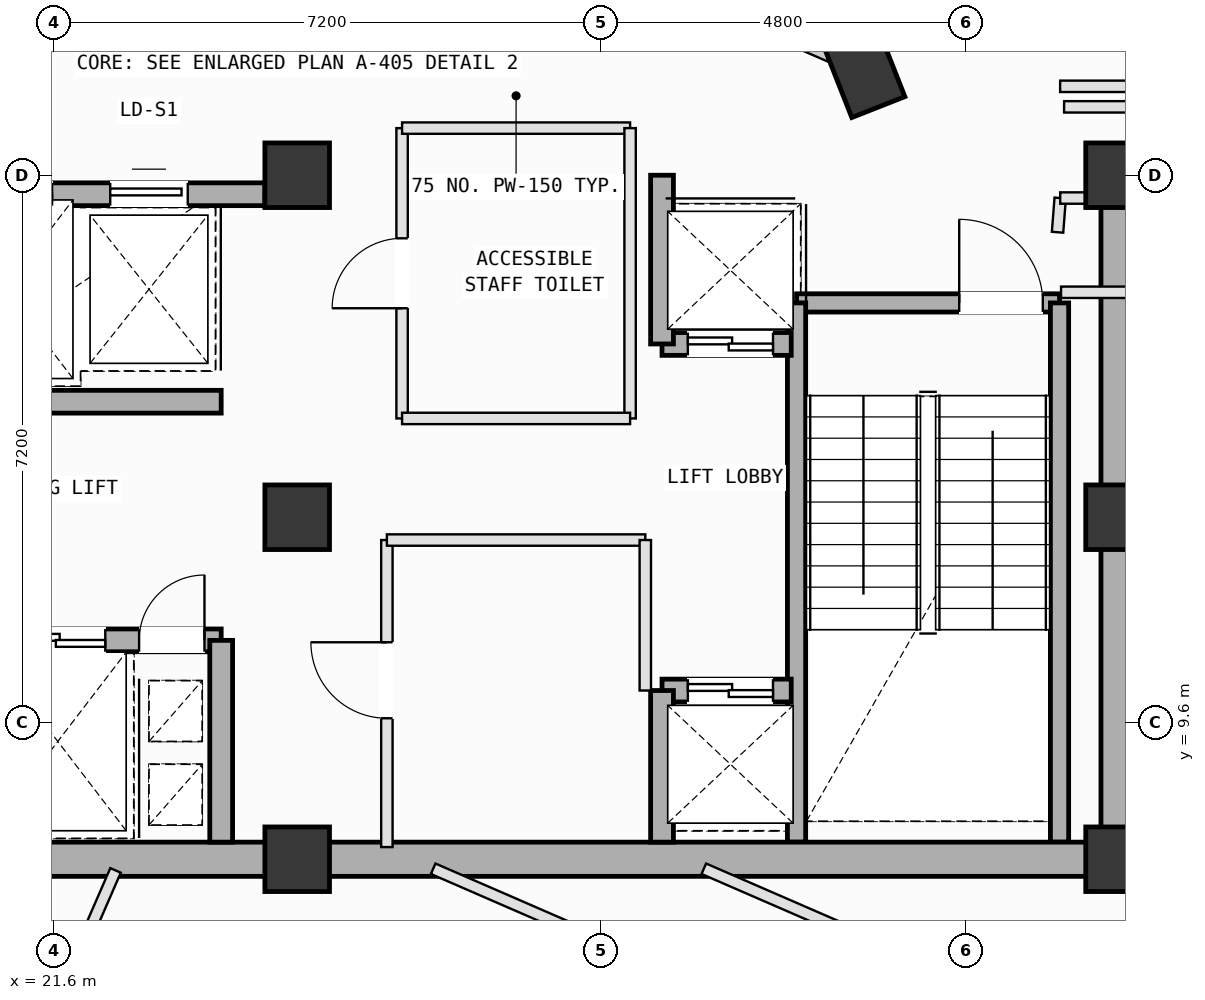
"""IFC4 building model, lengths in metres.
Left out: names, types, materials, properties, quantities, classifications, styles, units other than length and angle.
Written with IfcOpenShell. Run it as: python <this file> out.ifc"""

import sys

from ifc_helpers import new_model, si_unit, direction, frame, frame_2d, origin, origin_2d, place, context, subcontext, project, spatial, rectangle, extrude, element, fill, save


model = new_model("IFC4")
c1 = context("Model", 3, precision=1e-05, world=origin(), true_north=direction((0.0, 1.0)))
c2 = subcontext(c1, "Body", "Model", "MODEL_VIEW")
j1 = project(units=[si_unit("LENGTHUNIT", "METRE"), si_unit("PLANEANGLEUNIT", "RADIAN")], contexts=[c1])
p1 = place(None, origin())
s1 = spatial("IfcSite", under=j1, at=p1, CompositionType="ELEMENT")
p2 = place(p1, origin())
s2 = spatial("IfcBuilding", under=s1, at=p2, CompositionType="ELEMENT")
p3 = place(p2, frame((0.0, 0.0, 308.6)))
s3 = spatial("IfcBuildingStorey", under=s2, at=p3, CompositionType="ELEMENT", Elevation=308.6)
for number, where, z_axis, x_axis in (
    (1, (24.8, 7.8, 0.0), (0.0, 0.0, 1.0), (1.0, 0.0, 0.0)),
    (2, (24.8, 12.3, 0.0), (0.0, 0.0, 1.0), (1.0, 0.0, 0.0)),
    (3, (24.8, 16.8, 0.0), (0.0, 0.0, 1.0), (1.0, 0.0, 0.0)),
    (4, (35.6, 7.8, 0.0), (0.0, 0.0, 1.0), (1.0, 0.0, 0.0)),
    (5, (35.6, 12.3, 0.0), (0.0, 0.0, 1.0), (1.0, 0.0, 0.0)),
    (6, (35.6, 16.8, 0.0), (0.0, 0.0, 1.0), (1.0, 0.0, 0.0)),
):
    element("IfcColumn", number, at=place(p3, frame(where, z_axis=z_axis, x_axis=x_axis)), inside=s3, PredefinedType="COLUMN", context=c2, shape_type="SweptSolid", body=[
        extrude(rectangle(XDim=0.85, YDim=0.85, at=origin_2d()), origin(), (0.0, 0.0, 1.0), 4.0),
    ])
p4 = place(p3, frame((32.226, 18.255, 0.002), z_axis=(0.0, 0.0, 1.0), x_axis=(-0.366501226724, 0.930417567982, 0.0)))
e7 = element("IfcColumn", 7, at=p4, inside=s3, PredefinedType="COLUMN", context=c2, shape_type="SweptSolid", body=[
    extrude(rectangle(XDim=1.2, YDim=0.75, at=origin_2d()), origin(), (0.0, 0.0, 1.0), 3.996),
])
p5 = place(p3, frame((25.484, 21.187, 0.0), z_axis=(0.0, 0.0, 1.0), x_axis=(0.917060568388, -0.398747932794, 0.0)))
e8 = element("IfcWall", 8, at=p5, inside=s3, PredefinedType="SOLIDWALL", context=c2, shape_type="SweptSolid", body=[
    extrude(rectangle(XDim=6.955, YDim=0.28, at=frame_2d((3.478, 0.0))), origin(), (0.0, 0.0, 1.0), 2.765),
])
p6 = place(p3, frame((31.37, 15.12, 0.0), z_axis=(0.0, 0.0, 1.0), x_axis=(1.0, 0.0, 0.0)))
e9 = element("IfcWall", 9, at=p6, inside=s3, PredefinedType="SOLIDWALL", context=c2, shape_type="SweptSolid", body=[
    extrude(rectangle(XDim=3.46, YDim=0.24, at=frame_2d((1.73, 0.0))), origin(), (0.0, 0.0, 1.0), 3.78),
])
p7 = place(p6, frame((2.14, 0.0, 0.0)))
e10 = element("IfcOpeningElement", 10, at=p7, cuts=e9, PredefinedType="OPENING", context=c2, shape_type="SweptSolid", body=[
    extrude(rectangle(XDim=1.1, YDim=2.15, at=frame_2d((0.55, 1.075))), frame((0.0, 0.13, 0.0), z_axis=(0.0, -1.0, 0.0), x_axis=(1.0, 0.0, 0.0)), (0.0, 0.0, 1.0), 0.26),
])
for number, where, z_axis, x_axis in (
    (11, (34.83, 15.12, 0.0), (0.0, 0.0, 1.0), (0.0, -1.0, 0.0)),
    (12, (31.37, 8.025, 0.0), (0.0, 0.0, 1.0), (0.0, 1.0, 0.0)),
):
    element("IfcWall", number, at=place(p3, frame(where, z_axis=z_axis, x_axis=x_axis)), inside=s3, PredefinedType="SOLIDWALL", context=c2, shape_type="SweptSolid", body=[
        extrude(rectangle(XDim=7.095, YDim=0.24, at=frame_2d((3.548, 0.0))), origin(), (0.0, 0.0, 1.0), 3.78),
    ])
for number, where, z_axis, x_axis in (
    (13, (14.0, 7.8, 0.0), (0.0, 0.0, 1.0), (1.0, 0.0, 0.0)),
    (14, (24.8, 7.8, 0.0), (0.0, 0.0, 1.0), (1.0, 0.0, 0.0)),
):
    element("IfcWall", number, at=place(p3, frame(where, z_axis=z_axis, x_axis=x_axis)), inside=s3, PredefinedType="SHEAR", context=c2, shape_type="SweptSolid", body=[
        extrude(rectangle(XDim=10.8, YDim=0.45, at=frame_2d((5.4, 0.0))), origin(), (0.0, 0.0, 1.0), 3.78),
    ])
p8 = place(p3, frame((35.6, 7.8, 0.0), z_axis=(0.0, 0.0, 1.0), x_axis=(0.0, 1.0, 0.0)))
e15 = element("IfcWall", 15, at=p8, inside=s3, PredefinedType="SHEAR", context=c2, shape_type="SweptSolid", body=[
    extrude(rectangle(XDim=9.0, YDim=0.45, at=frame_2d((4.5, 0.0))), origin(), (0.0, 0.0, 1.0), 3.78),
])
p9 = place(p3, frame((19.85, 16.55, 0.0), z_axis=(0.0, 0.0, 1.0), x_axis=(1.0, 0.0, 0.0)))
e16 = element("IfcWall", 16, at=p9, inside=s3, PredefinedType="SOLIDWALL", context=c2, shape_type="SweptSolid", body=[
    extrude(rectangle(XDim=4.525, YDim=0.3, at=frame_2d((2.262, 0.0))), origin(), (0.0, 0.0, 1.0), 3.78),
])
p10 = place(p9, frame((0.475, 0.0, 0.0)))
e17 = element("IfcOpeningElement", 17, at=p10, cuts=e16, PredefinedType="OPENING", context=c2, shape_type="SweptSolid", body=[
    extrude(rectangle(XDim=1.25, YDim=2.18, at=frame_2d((0.625, 1.09))), frame((0.0, 0.16, 0.0), z_axis=(0.0, -1.0, 0.0), x_axis=(1.0, 0.0, 0.0)), (0.0, 0.0, 1.0), 0.32),
])
p11 = place(p9, frame((2.49, 0.0, 0.0)))
e18 = element("IfcOpeningElement", 18, at=p11, cuts=e16, PredefinedType="OPENING", context=c2, shape_type="SweptSolid", body=[
    extrude(rectangle(XDim=1.02, YDim=2.12, at=frame_2d((0.51, 1.06))), frame((0.0, 0.16, 0.0), z_axis=(0.0, -1.0, 0.0), x_axis=(1.0, 0.0, 0.0)), (0.0, 0.0, 1.0), 0.32),
])
p12 = place(p3, frame((18.5, 10.68, 0.0), z_axis=(0.0, 0.0, 1.0), x_axis=(1.0, 0.0, 0.0)))
e19 = element("IfcWall", 19, at=p12, inside=s3, PredefinedType="SOLIDWALL", context=c2, shape_type="SweptSolid", body=[
    extrude(rectangle(XDim=5.3, YDim=0.3, at=frame_2d((2.65, 0.0))), origin(), (0.0, 0.0, 1.0), 3.78),
])
p13 = place(p12, frame((4.22, 0.0, 0.0)))
e20 = element("IfcOpeningElement", 20, at=p13, cuts=e19, PredefinedType="OPENING", context=c2, shape_type="SweptSolid", body=[
    extrude(rectangle(XDim=0.86, YDim=2.06, at=frame_2d((0.43, 1.03))), frame((0.0, 0.16, 0.0), z_axis=(0.0, -1.0, 0.0), x_axis=(1.0, 0.0, 0.0)), (0.0, 0.0, 1.0), 0.32),
])
p14 = place(p12, frame((0.425, 0.0, 0.0)))
e21 = element("IfcOpeningElement", 21, at=p14, cuts=e19, PredefinedType="OPENING", context=c2, shape_type="SweptSolid", body=[
    extrude(rectangle(XDim=1.25, YDim=2.18, at=frame_2d((0.625, 1.09))), frame((0.0, 0.16, 0.0), z_axis=(0.0, -1.0, 0.0), x_axis=(1.0, 0.0, 0.0)), (0.0, 0.0, 1.0), 0.32),
])
p15 = place(p12, frame((2.525, 0.0, 0.0)))
e22 = element("IfcOpeningElement", 22, at=p15, cuts=e19, PredefinedType="OPENING", context=c2, shape_type="SweptSolid", body=[
    extrude(rectangle(XDim=1.25, YDim=2.18, at=frame_2d((0.625, 1.09))), frame((0.0, 0.16, 0.0), z_axis=(0.0, -1.0, 0.0), x_axis=(1.0, 0.0, 0.0)), (0.0, 0.0, 1.0), 0.32),
])
p16 = place(p3, frame((18.5, 13.82, 0.0), z_axis=(0.0, 0.0, 1.0), x_axis=(1.0, 0.0, 0.0)))
e23 = element("IfcWall", 23, at=p16, inside=s3, PredefinedType="SOLIDWALL", context=c2, shape_type="SweptSolid", body=[
    extrude(rectangle(XDim=5.3, YDim=0.3, at=frame_2d((2.65, 0.0))), origin(), (0.0, 0.0, 1.0), 3.78),
])
p17 = place(p16, frame((0.18, 0.0, 0.0)))
e24 = element("IfcOpeningElement", 24, at=p17, cuts=e23, PredefinedType="OPENING", context=c2, shape_type="SweptSolid", body=[
    extrude(rectangle(XDim=1.1, YDim=2.15, at=frame_2d((0.55, 1.075))), frame((0.0, 0.16, 0.0), z_axis=(0.0, -1.0, 0.0), x_axis=(1.0, 0.0, 0.0)), (0.0, 0.0, 1.0), 0.32),
])
p18 = place(p3, frame((23.8, 8.025, 0.0), z_axis=(0.0, 0.0, 1.0), x_axis=(0.0, 1.0, 0.0)))
e25 = element("IfcWall", 25, at=p18, inside=s3, PredefinedType="SOLIDWALL", context=c2, shape_type="SweptSolid", body=[
    extrude(rectangle(XDim=2.655, YDim=0.3, at=frame_2d((1.328, 0.0))), origin(), (0.0, 0.0, 1.0), 3.78),
])
p19 = place(p3, frame((29.6, 10.02, 0.0), z_axis=(0.0, 0.0, 1.0), x_axis=(1.0, 0.0, 0.0)))
e26 = element("IfcWall", 26, at=p19, inside=s3, PredefinedType="SOLIDWALL", context=c2, shape_type="SweptSolid", body=[
    extrude(rectangle(XDim=1.7, YDim=0.3, at=frame_2d((0.85, 0.0))), origin(), (0.0, 0.0, 1.0), 3.78),
])
p20 = place(p19, frame((0.34, 0.0, 0.0)))
e27 = element("IfcOpeningElement", 27, at=p20, cuts=e26, PredefinedType="OPENING", context=c2, shape_type="SweptSolid", body=[
    extrude(rectangle(XDim=1.12, YDim=2.15, at=frame_2d((0.56, 1.075))), frame((0.0, 0.16, 0.0), z_axis=(0.0, -1.0, 0.0), x_axis=(1.0, 0.0, 0.0)), (0.0, 0.0, 1.0), 0.32),
])
p21 = place(p3, frame((29.6, 8.025, 0.0), z_axis=(0.0, 0.0, 1.0), x_axis=(0.0, 1.0, 0.0)))
e28 = element("IfcWall", 28, at=p21, inside=s3, PredefinedType="SOLIDWALL", context=c2, shape_type="SweptSolid", body=[
    extrude(rectangle(XDim=1.995, YDim=0.3, at=frame_2d((0.998, 0.0))), origin(), (0.0, 0.0, 1.0), 3.78),
])
p22 = place(p3, frame((29.6, 14.58, 0.0), z_axis=(0.0, 0.0, 1.0), x_axis=(1.0, 0.0, 0.0)))
e29 = element("IfcWall", 29, at=p22, inside=s3, PredefinedType="SOLIDWALL", context=c2, shape_type="SweptSolid", body=[
    extrude(rectangle(XDim=1.7, YDim=0.3, at=frame_2d((0.85, 0.0))), origin(), (0.0, 0.0, 1.0), 3.78),
])
p23 = place(p22, frame((0.34, 0.0, 0.0)))
e30 = element("IfcOpeningElement", 30, at=p23, cuts=e29, PredefinedType="OPENING", context=c2, shape_type="SweptSolid", body=[
    extrude(rectangle(XDim=1.12, YDim=2.15, at=frame_2d((0.56, 1.075))), frame((0.0, 0.16, 0.0), z_axis=(0.0, -1.0, 0.0), x_axis=(1.0, 0.0, 0.0)), (0.0, 0.0, 1.0), 0.32),
])
p24 = place(p3, frame((29.6, 14.58, 0.0), z_axis=(0.0, 0.0, 1.0), x_axis=(0.0, 1.0, 0.0)))
e31 = element("IfcWall", 31, at=p24, inside=s3, PredefinedType="SOLIDWALL", context=c2, shape_type="SweptSolid", body=[
    extrude(rectangle(XDim=2.22, YDim=0.3, at=frame_2d((1.11, 0.0))), origin(), (0.0, 0.0, 1.0), 3.78),
])
p25 = place(p3, frame((25.98, 7.96, 0.0), z_axis=(0.0, 0.0, 1.0), x_axis=(0.0, 1.0, 0.0)))
e32 = element("IfcWall", 32, at=p25, inside=s3, PredefinedType="PARTITIONING", context=c2, shape_type="SweptSolid", body=[
    extrude(rectangle(XDim=4.04, YDim=0.15, at=frame_2d((2.02, 0.0))), origin(), (0.0, 0.0, 1.0), 3.78),
])
p26 = place(p25, frame((1.695, 0.0, 0.0)))
e33 = element("IfcOpeningElement", 33, at=p26, cuts=e32, PredefinedType="OPENING", context=c2, shape_type="SweptSolid", body=[
    extrude(rectangle(XDim=1.0, YDim=2.12, at=frame_2d((0.5, 1.06))), frame((0.0, 0.085, 0.0), z_axis=(0.0, -1.0, 0.0), x_axis=(1.0, 0.0, 0.0)), (0.0, 0.0, 1.0), 0.17),
])
p27 = place(p3, frame((25.98, 12.0, 0.0), z_axis=(0.0, 0.0, 1.0), x_axis=(1.0, 0.0, 0.0)))
e34 = element("IfcWall", 34, at=p27, inside=s3, PredefinedType="PARTITIONING", context=c2, shape_type="SweptSolid", body=[
    extrude(rectangle(XDim=3.4, YDim=0.15, at=frame_2d((1.7, 0.0))), origin(), (0.0, 0.0, 1.0), 3.78),
])
p28 = place(p3, frame((29.38, 12.0, 0.0), z_axis=(0.0, 0.0, 1.0), x_axis=(0.0, -1.0, 0.0)))
e35 = element("IfcWall", 35, at=p28, inside=s3, PredefinedType="PARTITIONING", context=c2, shape_type="SweptSolid", body=[
    extrude(rectangle(XDim=1.98, YDim=0.15, at=frame_2d((0.99, 0.0))), origin(), (0.0, 0.0, 1.0), 3.78),
])
p29 = place(p3, frame((26.18, 13.6, 0.0), z_axis=(0.0, 0.0, 1.0), x_axis=(0.0, 1.0, 0.0)))
e36 = element("IfcWall", 36, at=p29, inside=s3, PredefinedType="PARTITIONING", context=c2, shape_type="SweptSolid", body=[
    extrude(rectangle(XDim=3.82, YDim=0.15, at=frame_2d((1.91, 0.0))), origin(), (0.0, 0.0, 1.0), 3.78),
])
p30 = place(p29, frame((1.45, 0.0, 0.0)))
e37 = element("IfcOpeningElement", 37, at=p30, cuts=e36, PredefinedType="OPENING", context=c2, shape_type="SweptSolid", body=[
    extrude(rectangle(XDim=0.92, YDim=2.1, at=frame_2d((0.46, 1.05))), frame((0.0, 0.085, 0.0), z_axis=(0.0, -1.0, 0.0), x_axis=(1.0, 0.0, 0.0)), (0.0, 0.0, 1.0), 0.17),
])
p31 = place(p3, frame((26.18, 17.42, 0.0), z_axis=(0.0, 0.0, 1.0), x_axis=(1.0, 0.0, 0.0)))
e38 = element("IfcWall", 38, at=p31, inside=s3, PredefinedType="PARTITIONING", context=c2, shape_type="SweptSolid", body=[
    extrude(rectangle(XDim=3.0, YDim=0.15, at=frame_2d((1.5, 0.0))), origin(), (0.0, 0.0, 1.0), 3.78),
])
p32 = place(p3, frame((29.18, 17.42, 0.0), z_axis=(0.0, 0.0, 1.0), x_axis=(0.0, -1.0, 0.0)))
e39 = element("IfcWall", 39, at=p32, inside=s3, PredefinedType="PARTITIONING", context=c2, shape_type="SweptSolid", body=[
    extrude(rectangle(XDim=3.82, YDim=0.15, at=frame_2d((1.91, 0.0))), origin(), (0.0, 0.0, 1.0), 3.78),
])
p33 = place(p3, frame((29.18, 13.6, 0.0), z_axis=(0.0, 0.0, 1.0), x_axis=(-1.0, 0.0, 0.0)))
e40 = element("IfcWall", 40, at=p33, inside=s3, PredefinedType="PARTITIONING", context=c2, shape_type="SweptSolid", body=[
    extrude(rectangle(XDim=3.0, YDim=0.15, at=frame_2d((1.5, 0.0))), origin(), (0.0, 0.0, 1.0), 3.78),
])
p34 = place(p3, frame((33.286, -4.26, 0.0), z_axis=(0.0, 0.0, 1.0), x_axis=(0.398794571869, 0.9170402878, 0.0)))
e41 = element("IfcWall", 41, at=p34, inside=s3, PredefinedType="PARTITIONING", context=c2, shape_type="SweptSolid", body=[
    extrude(rectangle(XDim=13.04, YDim=0.15, at=frame_2d((6.52, 0.0))), origin(), (0.0, 0.0, 1.0), 2.765),
])
p35 = place(p3, frame((20.345, 2.905, 0.0), z_axis=(0.0, 0.0, 1.0), x_axis=(0.398819215719, 0.917029570501, 0.0)))
e42 = element("IfcWall", 42, at=p35, inside=s3, PredefinedType="PARTITIONING", context=c2, shape_type="SweptSolid", body=[
    extrude(rectangle(XDim=5.178, YDim=0.15, at=frame_2d((2.589, 0.0))), origin(), (0.0, 0.0, 1.0), 3.78),
])
p36 = place(p35, frame((2.075, 0.0, 0.0)))
e43 = element("IfcOpeningElement", 43, at=p36, cuts=e42, PredefinedType="OPENING", context=c2, shape_type="SweptSolid", body=[
    extrude(rectangle(XDim=0.86, YDim=2.06, at=frame_2d((0.43, 1.03))), frame((0.0, 0.085, 0.0), z_axis=(0.0, -1.0, 0.0), x_axis=(1.0, 0.0, 0.0)), (0.0, 0.0, 1.0), 0.17),
])
p37 = place(p3, frame((26.589, 7.675, 0.0), z_axis=(0.0, 0.0, 1.0), x_axis=(0.917085632944, -0.398690283112, 0.0)))
e44 = element("IfcWall", 44, at=p37, inside=s3, PredefinedType="PARTITIONING", context=c2, shape_type="SweptSolid", body=[
    extrude(rectangle(XDim=10.216, YDim=0.15, at=frame_2d((5.108, 0.0))), origin(), (0.0, 0.0, 1.0), 3.78),
])
p38 = place(p37, frame((5.131, 0.0, 0.0)))
e45 = element("IfcOpeningElement", 45, at=p38, cuts=e44, PredefinedType="OPENING", context=c2, shape_type="SweptSolid", body=[
    extrude(rectangle(XDim=0.86, YDim=2.06, at=frame_2d((0.43, 1.03))), frame((0.0, 0.085, 0.0), z_axis=(0.0, -1.0, 0.0), x_axis=(1.0, 0.0, 0.0)), (0.0, 0.0, 1.0), 0.17),
])
p39 = place(p3, frame((34.804, 16.05, 0.0), z_axis=(0.0, 0.0, 1.0), x_axis=(0.077896068279, 0.996961484987, 0.0)))
e46 = element("IfcWall", 46, at=p39, inside=s3, PredefinedType="PARTITIONING", context=c2, shape_type="SweptSolid", body=[
    extrude(rectangle(XDim=0.451, YDim=0.15, at=frame_2d((0.226, 0.0))), origin(), (0.0, 0.0, 1.0), 3.78),
])
p40 = place(p3, frame((34.839, 16.5, 0.0), z_axis=(0.0, 0.0, 1.0), x_axis=(1.0, 0.0, 0.0)))
e47 = element("IfcWall", 47, at=p40, inside=s3, PredefinedType="PARTITIONING", context=c2, shape_type="SweptSolid", body=[
    extrude(rectangle(XDim=1.661, YDim=0.15, at=frame_2d((0.831, 0.0))), origin(), (0.0, 0.0, 1.0), 2.765),
])
p41 = place(p3, frame((36.5, 17.7, 0.0), z_axis=(0.0, 0.0, 1.0), x_axis=(-1.0, 0.0, 0.0)))
e48 = element("IfcWall", 48, at=p41, inside=s3, PredefinedType="PARTITIONING", context=c2, shape_type="SweptSolid", body=[
    extrude(rectangle(XDim=1.61, YDim=0.15, at=frame_2d((0.805, 0.0))), origin(), (0.0, 0.0, 1.0), 3.78),
])
p42 = place(p3, frame((34.838, 17.97, 0.0), z_axis=(0.0, 0.0, 1.0), x_axis=(1.0, 0.0, 0.0)))
e49 = element("IfcWall", 49, at=p42, inside=s3, PredefinedType="PARTITIONING", context=c2, shape_type="SweptSolid", body=[
    extrude(rectangle(XDim=2.312, YDim=0.15, at=frame_2d((1.156, 0.0))), origin(), (0.0, 0.0, 1.0), 3.78),
])
p43 = place(p3, frame((36.15, 15.26, 0.0), z_axis=(0.0, 0.0, 1.0), x_axis=(-1.0, 0.0, 0.0)))
e50 = element("IfcWall", 50, at=p43, inside=s3, PredefinedType="PARTITIONING", context=c2, shape_type="SweptSolid", body=[
    extrude(rectangle(XDim=1.3, YDim=0.15, at=frame_2d((0.65, 0.0))), origin(), (0.0, 0.0, 1.0), 3.78),
])
p44 = place(p3, frame((30.15, 7.675, 0.0), z_axis=(0.0, 0.0, 1.0), x_axis=(0.917103960726, -0.398648122059, 0.0)))
e51 = element("IfcWall", 51, at=p44, inside=s3, PredefinedType="PARTITIONING", context=c2, shape_type="SweptSolid", body=[
    extrude(rectangle(XDim=5.266, YDim=0.15, at=frame_2d((2.633, 0.0))), origin(), (0.0, 0.0, 1.0), 3.78),
])
p45 = place(p7, origin())
e52 = element("IfcDoor", 52, at=p45, inside=s3, OperationType="SINGLE_SWING_LEFT", PredefinedType="DOOR", context=c2, shape_type="SweptSolid", body=[
    extrude(rectangle(XDim=1.1, YDim=2.15, at=frame_2d((0.55, 1.075))), frame((0.0, 0.025, 0.0), z_axis=(0.0, -1.0, 0.0), x_axis=(1.0, 0.0, 0.0)), (0.0, 0.0, 1.0), 0.05),
])
fill(e10, e52)
p46 = place(p13, origin())
e53 = element("IfcDoor", 53, at=p46, inside=s3, OperationType="SINGLE_SWING_RIGHT", PredefinedType="DOOR", context=c2, shape_type="SweptSolid", body=[
    extrude(rectangle(XDim=0.86, YDim=2.06, at=frame_2d((0.43, 1.03))), frame((0.0, 0.025, 0.0), z_axis=(0.0, -1.0, 0.0), x_axis=(1.0, 0.0, 0.0)), (0.0, 0.0, 1.0), 0.05),
])
fill(e20, e53)
p47 = place(p15, origin())
e54 = element("IfcDoor", 54, at=p47, inside=s3, OperationType="DOUBLE_DOOR_SLIDING", PredefinedType="DOOR", context=c2, shape_type="SweptSolid", body=[
    extrude(rectangle(XDim=1.25, YDim=2.18, at=frame_2d((0.625, 1.09))), frame((0.0, 0.025, 0.0), z_axis=(0.0, -1.0, 0.0), x_axis=(1.0, 0.0, 0.0)), (0.0, 0.0, 1.0), 0.05),
])
fill(e22, e54)
p48 = place(p20, origin())
e55 = element("IfcDoor", 55, at=p48, inside=s3, OperationType="DOUBLE_DOOR_SLIDING", PredefinedType="DOOR", context=c2, shape_type="SweptSolid", body=[
    extrude(rectangle(XDim=1.12, YDim=2.15, at=frame_2d((0.56, 1.075))), frame((0.0, 0.025, 0.0), z_axis=(0.0, -1.0, 0.0), x_axis=(1.0, 0.0, 0.0)), (0.0, 0.0, 1.0), 0.05),
])
fill(e27, e55)
p49 = place(p23, origin())
e56 = element("IfcDoor", 56, at=p49, inside=s3, OperationType="DOUBLE_DOOR_SLIDING", PredefinedType="DOOR", context=c2, shape_type="SweptSolid", body=[
    extrude(rectangle(XDim=1.12, YDim=2.15, at=frame_2d((0.56, 1.075))), frame((0.0, 0.025, 0.0), z_axis=(0.0, -1.0, 0.0), x_axis=(1.0, 0.0, 0.0)), (0.0, 0.0, 1.0), 0.05),
])
fill(e30, e56)
p50 = place(p11, origin())
e57 = element("IfcDoor", 57, at=p50, inside=s3, OperationType="SLIDING_TO_LEFT", PredefinedType="DOOR", context=c2, shape_type="SweptSolid", body=[
    extrude(rectangle(XDim=1.02, YDim=2.12, at=frame_2d((0.51, 1.06))), frame((0.0, 0.025, 0.0), z_axis=(0.0, -1.0, 0.0), x_axis=(1.0, 0.0, 0.0)), (0.0, 0.0, 1.0), 0.05),
])
fill(e18, e57)
p51 = place(p26, origin())
e58 = element("IfcDoor", 58, at=p51, inside=s3, OperationType="SINGLE_SWING_RIGHT", PredefinedType="DOOR", context=c2, shape_type="SweptSolid", body=[
    extrude(rectangle(XDim=1.0, YDim=2.12, at=frame_2d((0.5, 1.06))), frame((0.0, 0.025, 0.0), z_axis=(0.0, -1.0, 0.0), x_axis=(1.0, 0.0, 0.0)), (0.0, 0.0, 1.0), 0.05),
])
fill(e33, e58)
p52 = place(p30, origin())
e59 = element("IfcDoor", 59, at=p52, inside=s3, OperationType="SINGLE_SWING_LEFT", PredefinedType="DOOR", context=c2, shape_type="SweptSolid", body=[
    extrude(rectangle(XDim=0.92, YDim=2.1, at=frame_2d((0.46, 1.05))), frame((0.0, 0.025, 0.0), z_axis=(0.0, -1.0, 0.0), x_axis=(1.0, 0.0, 0.0)), (0.0, 0.0, 1.0), 0.05),
])
fill(e37, e59)
save(model, sys.argv[1])
